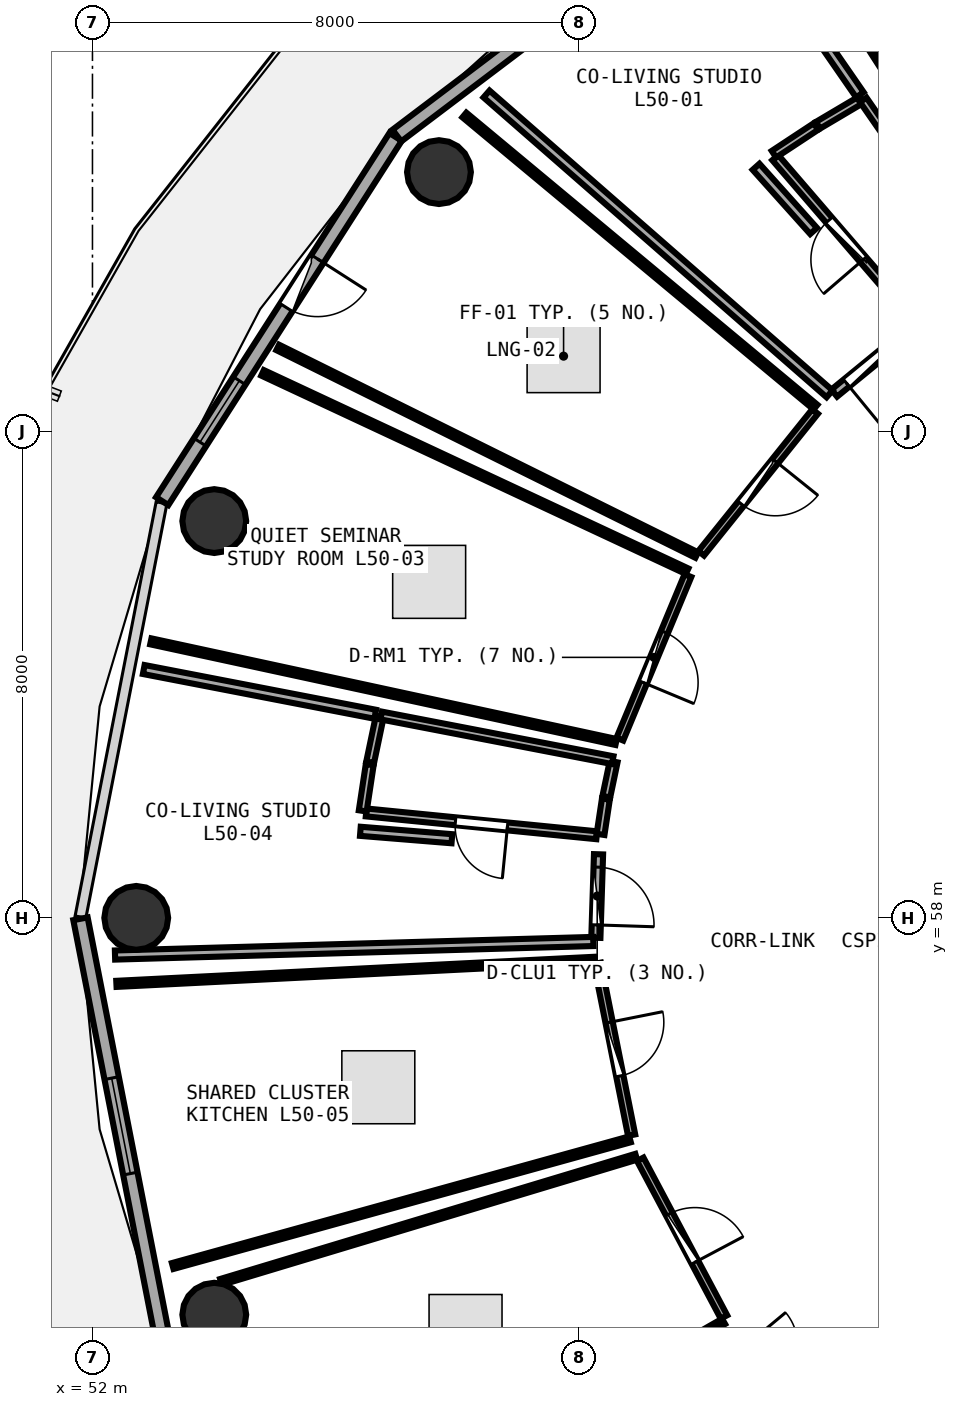
"""IFC4 building model, lengths in metres.
Left out: names, types, materials, properties, quantities, classifications, styles, units other than length and angle.
Written with IfcOpenShell. Run it as: python <this file> out.ifc"""

import sys

from ifc_helpers import new_model, si_unit, direction, frame, frame_2d, origin, origin_2d, place, context, subcontext, project, spatial, rectangle, circle, extrude, element, fill, save


model = new_model("IFC4")
c1 = context("Model", 3, precision=1e-05, world=origin(), true_north=direction((0.0, 1.0)))
c2 = subcontext(c1, "Body", "Model", "MODEL_VIEW")
j1 = project(units=[si_unit("LENGTHUNIT", "METRE"), si_unit("PLANEANGLEUNIT", "RADIAN")], contexts=[c1])
p1 = place(None, origin())
s1 = spatial("IfcSite", under=j1, at=p1, CompositionType="ELEMENT")
p2 = place(p1, origin())
s2 = spatial("IfcBuilding", under=s1, at=p2, CompositionType="ELEMENT")
p3 = place(p2, frame((0.0, 0.0, 196.95)))
s3 = spatial("IfcBuildingStorey", under=s2, at=p3, CompositionType="ELEMENT", Elevation=196.95)
for number, where, z_axis, x_axis in (
    (1, (57.698, 70.264, 0.0), (0.0, 0.0, 1.0), (1.0, 0.0, 0.0)),
    (2, (54.003, 64.526, 0.0), (0.0, 0.0, 1.0), (1.0, 0.0, 0.0)),
    (3, (52.72, 58.0, 0.0), (0.0, 0.0, 1.0), (1.0, 0.0, 0.0)),
    (4, (54.003, 51.474, 0.0), (0.0, 0.0, 1.0), (1.0, 0.0, 0.0)),
):
    element("IfcColumn", number, at=place(p3, frame(where, z_axis=z_axis, x_axis=x_axis)), inside=s3, PredefinedType="COLUMN", context=c2, shape_type="SweptSolid", body=[
        extrude(circle(Radius=0.525, at=origin_2d()), origin(), (0.0, 0.0, 1.0), 3.75),
    ])
p4 = place(p3, frame((62.888, 75.312, 0.0), z_axis=(0.0, 0.0, 1.0), x_axis=(-0.797701674595, -0.603052268338, 0.0)))
e5 = element("IfcWall", 5, at=p4, inside=s3, PredefinedType="SOLIDWALL", context=c2, shape_type="SweptSolid", body=[
    extrude(rectangle(XDim=7.374, YDim=0.24, at=frame_2d((3.687, 0.0))), origin(), (0.0, 0.0, 1.0), 3.475),
])
p5 = place(p4, frame((2.887, 0.0, 0.85)))
e6 = element("IfcOpeningElement", 6, at=p5, cuts=e5, PredefinedType="OPENING", context=c2, shape_type="SweptSolid", body=[
    extrude(rectangle(XDim=1.6, YDim=1.45, at=frame_2d((0.8, 0.725))), frame((0.0, 0.13, 0.0), z_axis=(0.0, -1.0, 0.0), x_axis=(1.0, 0.0, 0.0)), (0.0, 0.0, 1.0), 0.26),
])
p6 = place(p3, frame((56.986, 70.843, 0.0), z_axis=(0.0, 0.0, 1.0), x_axis=(-0.539539512973, -0.841960280501, 0.0)))
e7 = element("IfcWall", 7, at=p6, inside=s3, PredefinedType="SOLIDWALL", context=c2, shape_type="SweptSolid", body=[
    extrude(rectangle(XDim=7.115, YDim=0.24, at=frame_2d((3.557, 0.0))), origin(), (0.0, 0.0, 1.0), 3.475),
])
p7 = place(p6, frame((2.382, 0.0, 0.0)))
e8 = element("IfcOpeningElement", 8, at=p7, cuts=e7, PredefinedType="OPENING", context=c2, shape_type="SweptSolid", body=[
    extrude(rectangle(XDim=0.95, YDim=2.1, at=frame_2d((0.475, 1.05))), frame((0.0, 0.13, 0.0), z_axis=(0.0, -1.0, 0.0), x_axis=(1.0, 0.0, 0.0)), (0.0, 0.0, 1.0), 0.26),
])
p8 = place(p6, frame((4.762, 0.0, 0.85)))
e9 = element("IfcOpeningElement", 9, at=p8, cuts=e7, PredefinedType="OPENING", context=c2, shape_type="SweptSolid", body=[
    extrude(rectangle(XDim=1.2, YDim=1.45, at=frame_2d((0.6, 0.725))), frame((0.0, 0.13, 0.0), z_axis=(0.0, -1.0, 0.0), x_axis=(1.0, 0.0, 0.0)), (0.0, 0.0, 1.0), 0.26),
])
p9 = place(p3, frame((51.803, 57.985, 0.0), z_axis=(0.0, 0.0, 1.0), x_axis=(0.192069055673, -0.981381413036, 0.0)))
e10 = element("IfcWall", 10, at=p9, inside=s3, PredefinedType="SOLIDWALL", context=c2, shape_type="SweptSolid", body=[
    extrude(rectangle(XDim=6.94, YDim=0.24, at=frame_2d((3.47, 0.0))), origin(), (0.0, 0.0, 1.0), 3.475),
])
p10 = place(p9, frame((2.67, 0.0, 0.85)))
e11 = element("IfcOpeningElement", 11, at=p10, cuts=e10, PredefinedType="OPENING", context=c2, shape_type="SweptSolid", body=[
    extrude(rectangle(XDim=1.6, YDim=1.45, at=frame_2d((0.8, 0.725))), frame((0.0, 0.13, 0.0), z_axis=(0.0, -1.0, 0.0), x_axis=(1.0, 0.0, 0.0)), (0.0, 0.0, 1.0), 0.26),
])
p11 = place(p3, frame((65.56, 67.798, 0.0), z_axis=(0.0, 0.0, 1.0), x_axis=(-0.652591857515, 0.757709619515, 0.0)))
e12 = element("IfcWall", 12, at=p11, inside=s3, PredefinedType="PLUMBINGWALL", context=c2, shape_type="SweptSolid", body=[
    extrude(rectangle(XDim=3.57, YDim=0.13, at=frame_2d((1.785, 0.0))), origin(), (0.0, 0.0, 1.0), 3.025),
])
p12 = place(p11, frame((1.355, 0.0, 0.0)))
e13 = element("IfcOpeningElement", 13, at=p12, cuts=e12, PredefinedType="OPENING", context=c2, shape_type="SweptSolid", body=[
    extrude(rectangle(XDim=0.86, YDim=2.05, at=frame_2d((0.43, 1.025))), frame((0.0, 0.075, 0.0), z_axis=(0.0, -1.0, 0.0), x_axis=(1.0, 0.0, 0.0)), (0.0, 0.0, 1.0), 0.15),
])
p13 = place(p3, frame((65.336, 67.561, 0.0), z_axis=(0.0, 0.0, 1.0), x_axis=(-0.773453544763, -0.633852990917, 0.0)))
e14 = element("IfcWall", 14, at=p13, inside=s3, PredefinedType="PARTITIONING", context=c2, shape_type="SweptSolid", body=[
    extrude(rectangle(XDim=1.469, YDim=0.15, at=frame_2d((0.734, 0.0))), origin(), (0.0, 0.0, 1.0), 3.025),
])
p14 = place(p13, frame((0.259, 0.0, 0.0)))
e15 = element("IfcOpeningElement", 15, at=p14, cuts=e14, PredefinedType="OPENING", context=c2, shape_type="SweptSolid", body=[
    extrude(rectangle(XDim=0.95, YDim=2.08, at=frame_2d((0.475, 1.04))), frame((0.0, 0.085, 0.0), z_axis=(0.0, -1.0, 0.0), x_axis=(1.0, 0.0, 0.0)), (0.0, 0.0, 1.0), 0.17),
])
p15 = place(p3, frame((63.885, 66.327, 0.0), z_axis=(0.0, 0.0, 1.0), x_axis=(-0.626276824741, -0.779600756023, 0.0)))
e16 = element("IfcWall", 16, at=p15, inside=s3, PredefinedType="PARTITIONING", context=c2, shape_type="SweptSolid", body=[
    extrude(rectangle(XDim=2.99, YDim=0.12, at=frame_2d((1.495, 0.0))), origin(), (0.0, 0.0, 1.0), 3.025),
])
p16 = place(p15, frame((1.045, 0.0, 0.0)))
e17 = element("IfcOpeningElement", 17, at=p16, cuts=e16, PredefinedType="OPENING", context=c2, shape_type="SweptSolid", body=[
    extrude(rectangle(XDim=0.9, YDim=2.08, at=frame_2d((0.45, 1.04))), frame((0.0, 0.07, 0.0), z_axis=(0.0, -1.0, 0.0), x_axis=(1.0, 0.0, 0.0)), (0.0, 0.0, 1.0), 0.14),
])
p17 = place(p3, frame((61.793, 63.629, 0.0), z_axis=(0.0, 0.0, 1.0), x_axis=(-0.384145151494, -0.923272713007, 0.0)))
e18 = element("IfcWall", 18, at=p17, inside=s3, PredefinedType="PARTITIONING", context=c2, shape_type="SweptSolid", body=[
    extrude(rectangle(XDim=2.913, YDim=0.12, at=frame_2d((1.456, 0.0))), origin(), (0.0, 0.0, 1.0), 3.235),
])
p18 = place(p17, frame((1.006, 0.0, 0.0)))
e19 = element("IfcOpeningElement", 19, at=p18, cuts=e18, PredefinedType="OPENING", context=c2, shape_type="SweptSolid", body=[
    extrude(rectangle(XDim=0.9, YDim=2.08, at=frame_2d((0.45, 1.04))), frame((0.0, 0.07, 0.0), z_axis=(0.0, -1.0, 0.0), x_axis=(1.0, 0.0, 0.0)), (0.0, 0.0, 1.0), 0.14),
])
p19 = place(p3, frame((60.293, 59.359, 0.0), z_axis=(0.0, 0.0, 1.0), x_axis=(-0.995138182823, 0.098488563232, 0.0)))
e20 = element("IfcWall", 20, at=p19, inside=s3, PredefinedType="PLUMBINGWALL", context=c2, shape_type="SweptSolid", body=[
    extrude(rectangle(XDim=3.81, YDim=0.13, at=frame_2d((1.905, 0.0))), origin(), (0.0, 0.0, 1.0), 3.175),
])
p20 = place(p19, frame((1.475, 0.0, 0.0)))
e21 = element("IfcOpeningElement", 21, at=p20, cuts=e20, PredefinedType="OPENING", context=c2, shape_type="SweptSolid", body=[
    extrude(rectangle(XDim=0.86, YDim=2.05, at=frame_2d((0.43, 1.025))), frame((0.0, 0.075, 0.0), z_axis=(0.0, -1.0, 0.0), x_axis=(1.0, 0.0, 0.0)), (0.0, 0.0, 1.0), 0.15),
])
p21 = place(p3, frame((60.323, 59.046, 0.0), z_axis=(0.0, 0.0, 1.0), x_axis=(-0.032172559415, -0.999482329219, 0.0)))
e22 = element("IfcWall", 22, at=p21, inside=s3, PredefinedType="PARTITIONING", context=c2, shape_type="SweptSolid", body=[
    extrude(rectangle(XDim=1.374, YDim=0.15, at=frame_2d((0.687, 0.0))), origin(), (0.0, 0.0, 1.0), 3.025),
])
p22 = place(p21, frame((0.212, 0.0, 0.0)))
e23 = element("IfcOpeningElement", 23, at=p22, cuts=e22, PredefinedType="OPENING", context=c2, shape_type="SweptSolid", body=[
    extrude(rectangle(XDim=0.95, YDim=2.08, at=frame_2d((0.475, 1.04))), frame((0.0, 0.085, 0.0), z_axis=(0.0, -1.0, 0.0), x_axis=(1.0, 0.0, 0.0)), (0.0, 0.0, 1.0), 0.17),
])
p23 = place(p3, frame((60.303, 57.253, 0.0), z_axis=(0.0, 0.0, 1.0), x_axis=(0.195904296331, -0.980623019656, 0.0)))
e24 = element("IfcWall", 24, at=p23, inside=s3, PredefinedType="PARTITIONING", context=c2, shape_type="SweptSolid", body=[
    extrude(rectangle(XDim=2.881, YDim=0.12, at=frame_2d((1.441, 0.0))), origin(), (0.0, 0.0, 1.0), 3.48),
])
p24 = place(p23, frame((0.991, 0.0, 0.0)))
e25 = element("IfcOpeningElement", 25, at=p24, cuts=e24, PredefinedType="OPENING", context=c2, shape_type="SweptSolid", body=[
    extrude(rectangle(XDim=0.9, YDim=2.08, at=frame_2d((0.45, 1.04))), frame((0.0, 0.07, 0.0), z_axis=(0.0, -1.0, 0.0), x_axis=(1.0, 0.0, 0.0)), (0.0, 0.0, 1.0), 0.14),
])
p25 = place(p3, frame((61.009, 54.03, 0.0), z_axis=(0.0, 0.0, 1.0), x_axis=(0.468999166779, -0.883198608219, 0.0)))
e26 = element("IfcWall", 26, at=p25, inside=s3, PredefinedType="PARTITIONING", context=c2, shape_type="SweptSolid", body=[
    extrude(rectangle(XDim=2.936, YDim=0.12, at=frame_2d((1.468, 0.0))), origin(), (0.0, 0.0, 1.0), 3.235),
])
p26 = place(p25, frame((1.018, 0.0, 0.0)))
e27 = element("IfcOpeningElement", 27, at=p26, cuts=e26, PredefinedType="OPENING", context=c2, shape_type="SweptSolid", body=[
    extrude(rectangle(XDim=0.9, YDim=2.08, at=frame_2d((0.45, 1.04))), frame((0.0, 0.07, 0.0), z_axis=(0.0, -1.0, 0.0), x_axis=(1.0, 0.0, 0.0)), (0.0, 0.0, 1.0), 0.14),
])
p27 = place(p3, frame((67.113, 68.712, 0.0), z_axis=(0.0, 0.0, 1.0), x_axis=(-0.540224697902, 0.841520811256, 0.0)))
e28 = element("IfcWall", 28, at=p27, inside=s3, PredefinedType="PARTITIONING", context=c2, shape_type="SweptSolid", body=[
    extrude(rectangle(XDim=6.369, YDim=0.1, at=frame_2d((3.185, 0.0))), origin(), (0.0, 0.0, 1.0), 3.175),
])
p28 = place(p3, frame((63.208, 70.559, 0.0), z_axis=(0.0, 0.0, 1.0), x_axis=(0.835081531493, 0.550126199848, 0.0)))
e29 = element("IfcWall", 29, at=p28, inside=s3, PredefinedType="PLUMBINGWALL", context=c2, shape_type="SweptSolid", body=[
    extrude(rectangle(XDim=0.827, YDim=0.13, at=frame_2d((0.413, 0.0))), origin(), (0.0, 0.0, 1.0), 3.48),
])
p29 = place(p3, frame((63.932, 71.035, 0.0), z_axis=(0.0, 0.0, 1.0), x_axis=(0.860534659753, 0.509391891734, 0.0)))
e30 = element("IfcWall", 30, at=p29, inside=s3, PredefinedType="PLUMBINGWALL", context=c2, shape_type="SweptSolid", body=[
    extrude(rectangle(XDim=0.832, YDim=0.13, at=frame_2d((0.416, 0.0))), origin(), (0.0, 0.0, 1.0), 3.025),
])
p30 = place(p3, frame((64.677, 71.453, 0.0), z_axis=(0.0, 0.0, 1.0), x_axis=(0.569617686403, -0.821909782967, 0.0)))
e31 = element("IfcWall", 31, at=p30, inside=s3, PredefinedType="PLUMBINGWALL", context=c2, shape_type="SweptSolid", body=[
    extrude(rectangle(XDim=3.611, YDim=0.13, at=frame_2d((1.806, 0.0))), origin(), (0.0, 0.0, 1.0), 3.175),
])
p31 = place(p3, frame((64.123, 66.618, 0.0), z_axis=(0.0, 0.0, 1.0), x_axis=(-0.752988337425, 0.658033862124, 0.0)))
e32 = element("IfcWall", 32, at=p31, inside=s3, PredefinedType="PARTITIONING", context=c2, shape_type="SweptSolid", body=[
    extrude(rectangle(XDim=7.492, YDim=0.15, at=frame_2d((3.746, 0.0))), origin(), (0.0, 0.0, 1.0), 3.075),
])
p32 = place(p3, frame((62.566, 74.505, 0.0), z_axis=(0.0, 0.0, 1.0), x_axis=(0.569125600833, -0.822250600776, 0.0)))
e33 = element("IfcWall", 33, at=p32, inside=s3, PredefinedType="PARTITIONING", context=c2, shape_type="SweptSolid", body=[
    extrude(rectangle(XDim=3.611, YDim=0.15, at=frame_2d((1.806, 0.0))), origin(), (0.0, 0.0, 1.0), 3.025),
])
p33 = place(p3, frame((62.914, 70.352, 0.0), z_axis=(0.0, 0.0, 1.0), x_axis=(0.667393587085, -0.744705176508, 0.0)))
e34 = element("IfcWall", 34, at=p33, inside=s3, PredefinedType="PARTITIONING", context=c2, shape_type="SweptSolid", body=[
    extrude(rectangle(XDim=1.418, YDim=0.15, at=frame_2d((0.709, 0.0))), origin(), (0.0, 0.0, 1.0), 3.175),
])
p34 = place(p3, frame((61.938, 63.967, 0.0), z_axis=(0.0, 0.0, 1.0), x_axis=(-0.896052906747, 0.443947281003, 0.0)))
e35 = element("IfcWall", 35, at=p34, inside=s3, PredefinedType="PARTITIONING", context=c2, shape_type="SweptSolid", body=[
    extrude(rectangle(XDim=7.691, YDim=0.1, at=frame_2d((3.845, 0.0))), origin(), (0.0, 0.0, 1.0), 3.025),
])
p35 = place(p3, frame((58.117, 71.203, 0.0), z_axis=(0.0, 0.0, 1.0), x_axis=(0.768764498043, -0.63953197461, 0.0)))
e36 = element("IfcWall", 36, at=p35, inside=s3, PredefinedType="PARTITIONING", context=c2, shape_type="SweptSolid", body=[
    extrude(rectangle(XDim=7.511, YDim=0.1, at=frame_2d((3.756, 0.0))), origin(), (0.0, 0.0, 1.0), 3.025),
])
p36 = place(p3, frame((60.612, 60.893, 0.0), z_axis=(0.0, 0.0, 1.0), x_axis=(-0.977397622815, 0.211409287676, 0.0)))
e37 = element("IfcWall", 37, at=p36, inside=s3, PredefinedType="PARTITIONING", context=c2, shape_type="SweptSolid", body=[
    extrude(rectangle(XDim=7.829, YDim=0.1, at=frame_2d((3.914, 0.0))), origin(), (0.0, 0.0, 1.0), 3.075),
])
p37 = place(p3, frame((54.797, 66.963, 0.0), z_axis=(0.0, 0.0, 1.0), x_axis=(0.906002589331, -0.423272144283, 0.0)))
e38 = element("IfcWall", 38, at=p37, inside=s3, PredefinedType="PARTITIONING", context=c2, shape_type="SweptSolid", body=[
    extrude(rectangle(XDim=7.707, YDim=0.1, at=frame_2d((3.854, 0.0))), origin(), (0.0, 0.0, 1.0), 3.025),
])
p38 = place(p3, frame((60.572, 60.57, 0.0), z_axis=(0.0, 0.0, 1.0), x_axis=(-0.205112412682, -0.978738421727, 0.0)))
e39 = element("IfcWall", 39, at=p38, inside=s3, PredefinedType="PLUMBINGWALL", context=c2, shape_type="SweptSolid", body=[
    extrude(rectangle(XDim=0.589, YDim=0.13, at=frame_2d((0.294, 0.0))), origin(), (0.0, 0.0, 1.0), 3.48),
])
p39 = place(p3, frame((60.444, 59.954, 0.0), z_axis=(0.0, 0.0, 1.0), x_axis=(-0.149903785265, -0.98870058924, 0.0)))
e40 = element("IfcWall", 40, at=p39, inside=s3, PredefinedType="PLUMBINGWALL", context=c2, shape_type="SweptSolid", body=[
    extrude(rectangle(XDim=0.588, YDim=0.13, at=frame_2d((0.294, 0.0))), origin(), (0.0, 0.0, 1.0), 3.48),
])
p40 = place(p3, frame((56.445, 59.76, 0.0), z_axis=(0.0, 0.0, 1.0), x_axis=(0.149504479532, 0.988761048282, 0.0)))
e41 = element("IfcWall", 41, at=p40, inside=s3, PredefinedType="PLUMBINGWALL", context=c2, shape_type="SweptSolid", body=[
    extrude(rectangle(XDim=0.769, YDim=0.13, at=frame_2d((0.385, 0.0))), origin(), (0.0, 0.0, 1.0), 3.48),
])
p41 = place(p3, frame((56.567, 60.56, 0.0), z_axis=(0.0, 0.0, 1.0), x_axis=(0.205018710415, 0.978758054056, 0.0)))
e42 = element("IfcWall", 42, at=p41, inside=s3, PredefinedType="PLUMBINGWALL", context=c2, shape_type="SweptSolid", body=[
    extrude(rectangle(XDim=0.769, YDim=0.13, at=frame_2d((0.385, 0.0))), origin(), (0.0, 0.0, 1.0), 3.48),
])
p42 = place(p3, frame((56.749, 61.328, 0.0), z_axis=(0.0, 0.0, 1.0), x_axis=(0.981906173962, -0.189368068941, 0.0)))
e43 = element("IfcWall", 43, at=p42, inside=s3, PredefinedType="PLUMBINGWALL", context=c2, shape_type="SweptSolid", body=[
    extrude(rectangle(XDim=3.878, YDim=0.13, at=frame_2d((1.939, 0.0))), origin(), (0.0, 0.0, 1.0), 3.175),
])
p43 = place(p3, frame((60.237, 57.612, 0.0), z_axis=(0.0, 0.0, 1.0), x_axis=(-0.999599617875, -0.028294945576, 0.0)))
e44 = element("IfcWall", 44, at=p43, inside=s3, PredefinedType="PARTITIONING", context=c2, shape_type="SweptSolid", body=[
    extrude(rectangle(XDim=7.869, YDim=0.15, at=frame_2d((3.935, 0.0))), origin(), (0.0, 0.0, 1.0), 3.075),
])
p44 = place(p3, frame((52.843, 62.084, 0.0), z_axis=(0.0, 0.0, 1.0), x_axis=(0.981831342876, -0.189755669601, 0.0)))
e45 = element("IfcWall", 45, at=p44, inside=s3, PredefinedType="PARTITIONING", context=c2, shape_type="SweptSolid", body=[
    extrude(rectangle(XDim=3.878, YDim=0.15, at=frame_2d((1.939, 0.0))), origin(), (0.0, 0.0, 1.0), 3.075),
])
p45 = place(p3, frame((56.406, 59.424, 0.0), z_axis=(0.0, 0.0, 1.0), x_axis=(0.996727287989, -0.080837574046, 0.0)))
e46 = element("IfcWall", 46, at=p45, inside=s3, PredefinedType="PARTITIONING", context=c2, shape_type="SweptSolid", body=[
    extrude(rectangle(XDim=1.51, YDim=0.15, at=frame_2d((0.755, 0.0))), origin(), (0.0, 0.0, 1.0), 3.48),
])
p46 = place(p3, frame((60.841, 54.358, 0.0), z_axis=(0.0, 0.0, 1.0), x_axis=(-0.963696964369, -0.266998428582, 0.0)))
e47 = element("IfcWall", 47, at=p46, inside=s3, PredefinedType="PARTITIONING", context=c2, shape_type="SweptSolid", body=[
    extrude(rectangle(XDim=7.804, YDim=0.1, at=frame_2d((3.902, 0.0))), origin(), (0.0, 0.0, 1.0), 3.075),
])
p47 = place(p3, frame((52.394, 56.915, 0.0), z_axis=(0.0, 0.0, 1.0), x_axis=(0.998738681635, 0.050210016992, 0.0)))
e48 = element("IfcWall", 48, at=p47, inside=s3, PredefinedType="PARTITIONING", context=c2, shape_type="SweptSolid", body=[
    extrude(rectangle(XDim=7.867, YDim=0.1, at=frame_2d((3.934, 0.0))), origin(), (0.0, 0.0, 1.0), 3.075),
])
p48 = place(p3, frame((62.379, 51.364, 0.0), z_axis=(0.0, 0.0, 1.0), x_axis=(-0.868127220156, -0.496341746808, 0.0)))
e49 = element("IfcWall", 49, at=p48, inside=s3, PredefinedType="PARTITIONING", context=c2, shape_type="SweptSolid", body=[
    extrude(rectangle(XDim=7.648, YDim=0.1, at=frame_2d((3.824, 0.0))), origin(), (0.0, 0.0, 1.0), 3.025),
])
p49 = place(p3, frame((54.114, 52.013, 0.0), z_axis=(0.0, 0.0, 1.0), x_axis=(0.957454305291, 0.288584915198, 0.0)))
e50 = element("IfcWall", 50, at=p49, inside=s3, PredefinedType="PARTITIONING", context=c2, shape_type="SweptSolid", body=[
    extrude(rectangle(XDim=7.133, YDim=0.1, at=frame_2d((3.566, 0.0))), origin(), (0.0, 0.0, 1.0), 3.075),
])
p50 = place(p7, frame((0.95, 0.0, 0.0), z_axis=(0.0, 0.0, 1.0), x_axis=(-1.0, 0.0, 0.0)))
e51 = element("IfcDoor", 51, at=p50, inside=s3, OperationType="SINGLE_SWING_RIGHT", PredefinedType="DOOR", context=c2, shape_type="SweptSolid", body=[
    extrude(rectangle(XDim=0.95, YDim=2.1, at=frame_2d((0.475, 1.05))), frame((0.0, 0.025, 0.0), z_axis=(0.0, -1.0, 0.0), x_axis=(1.0, 0.0, 0.0)), (0.0, 0.0, 1.0), 0.05),
])
fill(e8, e51)
p51 = place(p8, origin())
e52 = element("IfcWindow", 52, at=p51, inside=s3, PartitioningType="SINGLE_PANEL", PredefinedType="WINDOW", context=c2, shape_type="SweptSolid", body=[
    extrude(rectangle(XDim=1.2, YDim=1.45, at=frame_2d((0.6, 0.725))), frame((0.0, 0.03, 0.0), z_axis=(0.0, -1.0, 0.0), x_axis=(1.0, 0.0, 0.0)), (0.0, 0.0, 1.0), 0.06),
])
fill(e9, e52)
p52 = place(p10, origin())
e53 = element("IfcWindow", 53, at=p52, inside=s3, PartitioningType="SINGLE_PANEL", PredefinedType="WINDOW", context=c2, shape_type="SweptSolid", body=[
    extrude(rectangle(XDim=1.6, YDim=1.45, at=frame_2d((0.8, 0.725))), frame((0.0, 0.03, 0.0), z_axis=(0.0, -1.0, 0.0), x_axis=(1.0, 0.0, 0.0)), (0.0, 0.0, 1.0), 0.06),
])
fill(e11, e53)
p53 = place(p12, origin())
e54 = element("IfcDoor", 54, at=p53, inside=s3, OperationType="SINGLE_SWING_LEFT", PredefinedType="DOOR", context=c2, shape_type="SweptSolid", body=[
    extrude(rectangle(XDim=0.86, YDim=2.05, at=frame_2d((0.43, 1.025))), frame((0.0, 0.025, 0.0), z_axis=(0.0, -1.0, 0.0), x_axis=(1.0, 0.0, 0.0)), (0.0, 0.0, 1.0), 0.05),
])
fill(e13, e54)
p54 = place(p14, origin())
e55 = element("IfcDoor", 55, at=p54, inside=s3, OperationType="SINGLE_SWING_RIGHT", PredefinedType="DOOR", context=c2, shape_type="SweptSolid", body=[
    extrude(rectangle(XDim=0.95, YDim=2.08, at=frame_2d((0.475, 1.04))), frame((0.0, 0.025, 0.0), z_axis=(0.0, -1.0, 0.0), x_axis=(1.0, 0.0, 0.0)), (0.0, 0.0, 1.0), 0.05),
])
fill(e15, e55)
p55 = place(p16, origin())
e56 = element("IfcDoor", 56, at=p55, inside=s3, OperationType="SINGLE_SWING_LEFT", PredefinedType="DOOR", context=c2, shape_type="SweptSolid", body=[
    extrude(rectangle(XDim=0.9, YDim=2.08, at=frame_2d((0.45, 1.04))), frame((0.0, 0.025, 0.0), z_axis=(0.0, -1.0, 0.0), x_axis=(1.0, 0.0, 0.0)), (0.0, 0.0, 1.0), 0.05),
])
fill(e17, e56)
p56 = place(p18, origin())
e57 = element("IfcDoor", 57, at=p56, inside=s3, OperationType="SINGLE_SWING_RIGHT", PredefinedType="DOOR", context=c2, shape_type="SweptSolid", body=[
    extrude(rectangle(XDim=0.9, YDim=2.08, at=frame_2d((0.45, 1.04))), frame((0.0, 0.025, 0.0), z_axis=(0.0, -1.0, 0.0), x_axis=(1.0, 0.0, 0.0)), (0.0, 0.0, 1.0), 0.05),
])
fill(e19, e57)
p57 = place(p20, origin())
e58 = element("IfcDoor", 58, at=p57, inside=s3, OperationType="SINGLE_SWING_LEFT", PredefinedType="DOOR", context=c2, shape_type="SweptSolid", body=[
    extrude(rectangle(XDim=0.86, YDim=2.05, at=frame_2d((0.43, 1.025))), frame((0.0, 0.025, 0.0), z_axis=(0.0, -1.0, 0.0), x_axis=(1.0, 0.0, 0.0)), (0.0, 0.0, 1.0), 0.05),
])
fill(e21, e58)
p58 = place(p22, origin())
e59 = element("IfcDoor", 59, at=p58, inside=s3, OperationType="SINGLE_SWING_RIGHT", PredefinedType="DOOR", context=c2, shape_type="SweptSolid", body=[
    extrude(rectangle(XDim=0.95, YDim=2.08, at=frame_2d((0.475, 1.04))), frame((0.0, 0.025, 0.0), z_axis=(0.0, -1.0, 0.0), x_axis=(1.0, 0.0, 0.0)), (0.0, 0.0, 1.0), 0.05),
])
fill(e23, e59)
p59 = place(p24, origin())
e60 = element("IfcDoor", 60, at=p59, inside=s3, OperationType="SINGLE_SWING_LEFT", PredefinedType="DOOR", context=c2, shape_type="SweptSolid", body=[
    extrude(rectangle(XDim=0.9, YDim=2.08, at=frame_2d((0.45, 1.04))), frame((0.0, 0.025, 0.0), z_axis=(0.0, -1.0, 0.0), x_axis=(1.0, 0.0, 0.0)), (0.0, 0.0, 1.0), 0.05),
])
fill(e25, e60)
p60 = place(p26, origin())
e61 = element("IfcDoor", 61, at=p60, inside=s3, OperationType="SINGLE_SWING_RIGHT", PredefinedType="DOOR", context=c2, shape_type="SweptSolid", body=[
    extrude(rectangle(XDim=0.9, YDim=2.08, at=frame_2d((0.45, 1.04))), frame((0.0, 0.025, 0.0), z_axis=(0.0, -1.0, 0.0), x_axis=(1.0, 0.0, 0.0)), (0.0, 0.0, 1.0), 0.05),
])
fill(e27, e61)
save(model, sys.argv[1])
